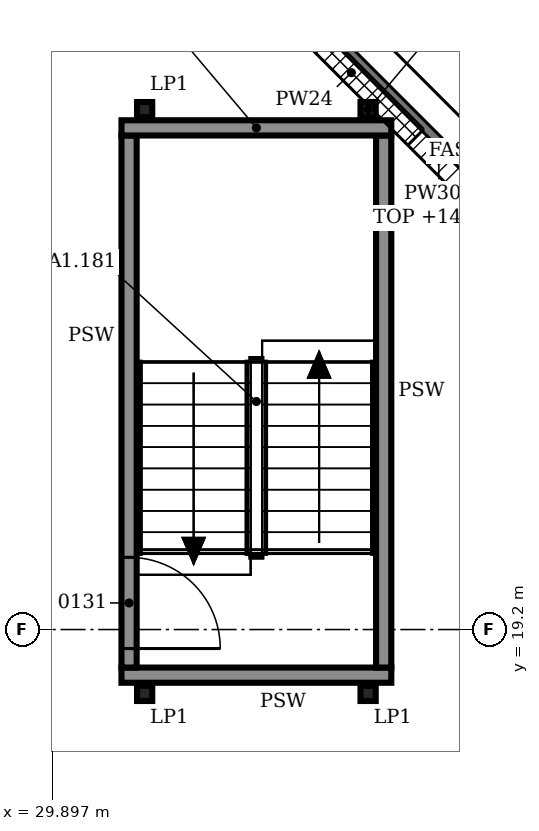
"""IFC4 building model, lengths in metres.
Left out: names, types, materials, properties, quantities, classifications, styles, units other than length and angle.
Written with IfcOpenShell. Run it as: python <this file> out.ifc"""

import sys

from ifc_helpers import new_model, si_unit, direction, frame, frame_2d, origin, origin_2d, place, context, subcontext, project, spatial, rectangle, i_section, extrude, element, fill, save


model = new_model("IFC4")
c1 = context("Model", 3, precision=1e-05, world=origin(), true_north=direction((0.0, 1.0)))
c2 = subcontext(c1, "Body", "Model", "MODEL_VIEW")
j1 = project(units=[si_unit("LENGTHUNIT", "METRE"), si_unit("PLANEANGLEUNIT", "RADIAN")], contexts=[c1])
p1 = place(None, origin())
s1 = spatial("IfcSite", under=j1, at=p1, CompositionType="ELEMENT")
p2 = place(p1, origin())
s2 = spatial("IfcBuilding", under=s1, at=p2, CompositionType="ELEMENT")
p3 = place(p2, frame((0.0, 0.0, 9.0)))
s3 = spatial("IfcBuildingStorey", under=s2, at=p3, CompositionType="ELEMENT", Elevation=9.0)
for number, where, z_axis, x_axis in (
    (1, (31.105, 26.04, 0.0), (0.0, 0.0, 1.0), (1.0, 0.0, 0.0)),
    (2, (34.045, 26.04, 0.0), (0.0, 0.0, 1.0), (1.0, 0.0, 0.0)),
    (3, (31.105, 18.36, 0.0), (0.0, 0.0, 1.0), (1.0, 0.0, 0.0)),
    (4, (34.045, 18.36, 0.0), (0.0, 0.0, 1.0), (1.0, 0.0, 0.0)),
):
    element("IfcColumn", number, at=place(p3, frame(where, z_axis=z_axis, x_axis=x_axis)), inside=s3, PredefinedType="COLUMN", context=c2, shape_type="SweptSolid", body=[
        extrude(i_section(OverallWidth=0.2, OverallDepth=0.2, WebThickness=0.009, FlangeThickness=0.015, FilletRadius=0.018, at=origin_2d()), origin(), (0.0, 0.0, 1.0), 6.0),
    ])
p4 = place(p3, frame((37.277, 23.075, 0.0), z_axis=(0.0, 0.0, 1.0), x_axis=(-0.707088024292, 0.707125537583, 0.0)))
e5 = element("IfcWall", 5, at=p4, inside=s3, PredefinedType="SOLIDWALL", context=c2, shape_type="SweptSolid", body=[
    extrude(rectangle(XDim=6.508, YDim=0.3, at=frame_2d((3.254, 0.0))), origin(), (0.0, 0.0, 1.0), 5.2),
])
p5 = place(p4, frame((0.427, 0.0, 0.9)))
e6 = element("IfcOpeningElement", 6, at=p5, cuts=e5, PredefinedType="OPENING", context=c2, shape_type="SweptSolid", body=[
    extrude(rectangle(XDim=2.4, YDim=2.4, at=frame_2d((1.2, 1.2))), frame((0.0, 0.16, 0.0), z_axis=(0.0, -1.0, 0.0), x_axis=(1.0, 0.0, 0.0)), (0.0, 0.0, 1.0), 0.32),
])
p6 = place(p4, frame((3.681, 0.0, 0.9)))
e7 = element("IfcOpeningElement", 7, at=p6, cuts=e5, PredefinedType="OPENING", context=c2, shape_type="SweptSolid", body=[
    extrude(rectangle(XDim=2.4, YDim=2.4, at=frame_2d((1.2, 1.2))), frame((0.0, 0.16, 0.0), z_axis=(0.0, -1.0, 0.0), x_axis=(1.0, 0.0, 0.0)), (0.0, 0.0, 1.0), 0.32),
])
p7 = place(p3, frame((30.8, 18.6, 0.0), z_axis=(0.0, 0.0, 1.0), x_axis=(1.0, 0.0, 0.0)))
e8 = element("IfcWall", 8, at=p7, inside=s3, PredefinedType="SOLIDWALL", context=c2, shape_type="SweptSolid", body=[
    extrude(rectangle(XDim=3.55, YDim=0.2, at=frame_2d((1.775, 0.0))), origin(), (0.0, 0.0, 1.0), 5.8),
])
p8 = place(p3, frame((30.9, 18.7, 0.0), z_axis=(0.0, 0.0, 1.0), x_axis=(0.0, 1.0, 0.0)))
e9 = element("IfcWall", 9, at=p8, inside=s3, PredefinedType="SOLIDWALL", context=c2, shape_type="SweptSolid", body=[
    extrude(rectangle(XDim=7.0, YDim=0.2, at=frame_2d((3.5, 0.0))), origin(), (0.0, 0.0, 1.0), 5.8),
])
p9 = place(p8, frame((0.25, 0.0, 0.0)))
e10 = element("IfcOpeningElement", 10, at=p9, cuts=e9, PredefinedType="OPENING", context=c2, shape_type="SweptSolid", body=[
    extrude(rectangle(XDim=1.2, YDim=2.1, at=frame_2d((0.6, 1.05))), frame((0.0, 0.11, 0.0), z_axis=(0.0, -1.0, 0.0), x_axis=(1.0, 0.0, 0.0)), (0.0, 0.0, 1.0), 0.22),
])
p10 = place(p3, frame((34.25, 18.7, 0.0), z_axis=(0.0, 0.0, 1.0), x_axis=(0.0, 1.0, 0.0)))
e11 = element("IfcWall", 11, at=p10, inside=s3, PredefinedType="SOLIDWALL", context=c2, shape_type="SweptSolid", body=[
    extrude(rectangle(XDim=7.0, YDim=0.2, at=frame_2d((3.5, 0.0))), origin(), (0.0, 0.0, 1.0), 5.8),
])
p11 = place(p3, frame((30.8, 25.8, 0.0), z_axis=(0.0, 0.0, 1.0), x_axis=(1.0, 0.0, 0.0)))
e12 = element("IfcWall", 12, at=p11, inside=s3, PredefinedType="SOLIDWALL", context=c2, shape_type="SweptSolid", body=[
    extrude(rectangle(XDim=3.55, YDim=0.2, at=frame_2d((1.775, 0.0))), origin(), (0.0, 0.0, 1.0), 5.8),
])
p12 = place(p6, origin())
e13 = element("IfcWindow", 13, at=p12, inside=s3, PartitioningType="SINGLE_PANEL", PredefinedType="WINDOW", context=c2, shape_type="SweptSolid", body=[
    extrude(rectangle(XDim=2.4, YDim=2.4, at=frame_2d((1.2, 1.2))), frame((0.0, 0.03, 0.0), z_axis=(0.0, -1.0, 0.0), x_axis=(1.0, 0.0, 0.0)), (0.0, 0.0, 1.0), 0.06),
])
fill(e7, e13)
p13 = place(p9, frame((1.2, 0.0, 0.0), z_axis=(0.0, 0.0, 1.0), x_axis=(-1.0, 0.0, 0.0)))
e14 = element("IfcDoor", 14, at=p13, inside=s3, OperationType="SINGLE_SWING_RIGHT", PredefinedType="DOOR", context=c2, shape_type="SweptSolid", body=[
    extrude(rectangle(XDim=1.2, YDim=2.1, at=frame_2d((0.6, 1.05))), frame((0.0, 0.025, 0.0), z_axis=(0.0, -1.0, 0.0), x_axis=(1.0, 0.0, 0.0)), (0.0, 0.0, 1.0), 0.05),
])
fill(e10, e14)
save(model, sys.argv[1])
